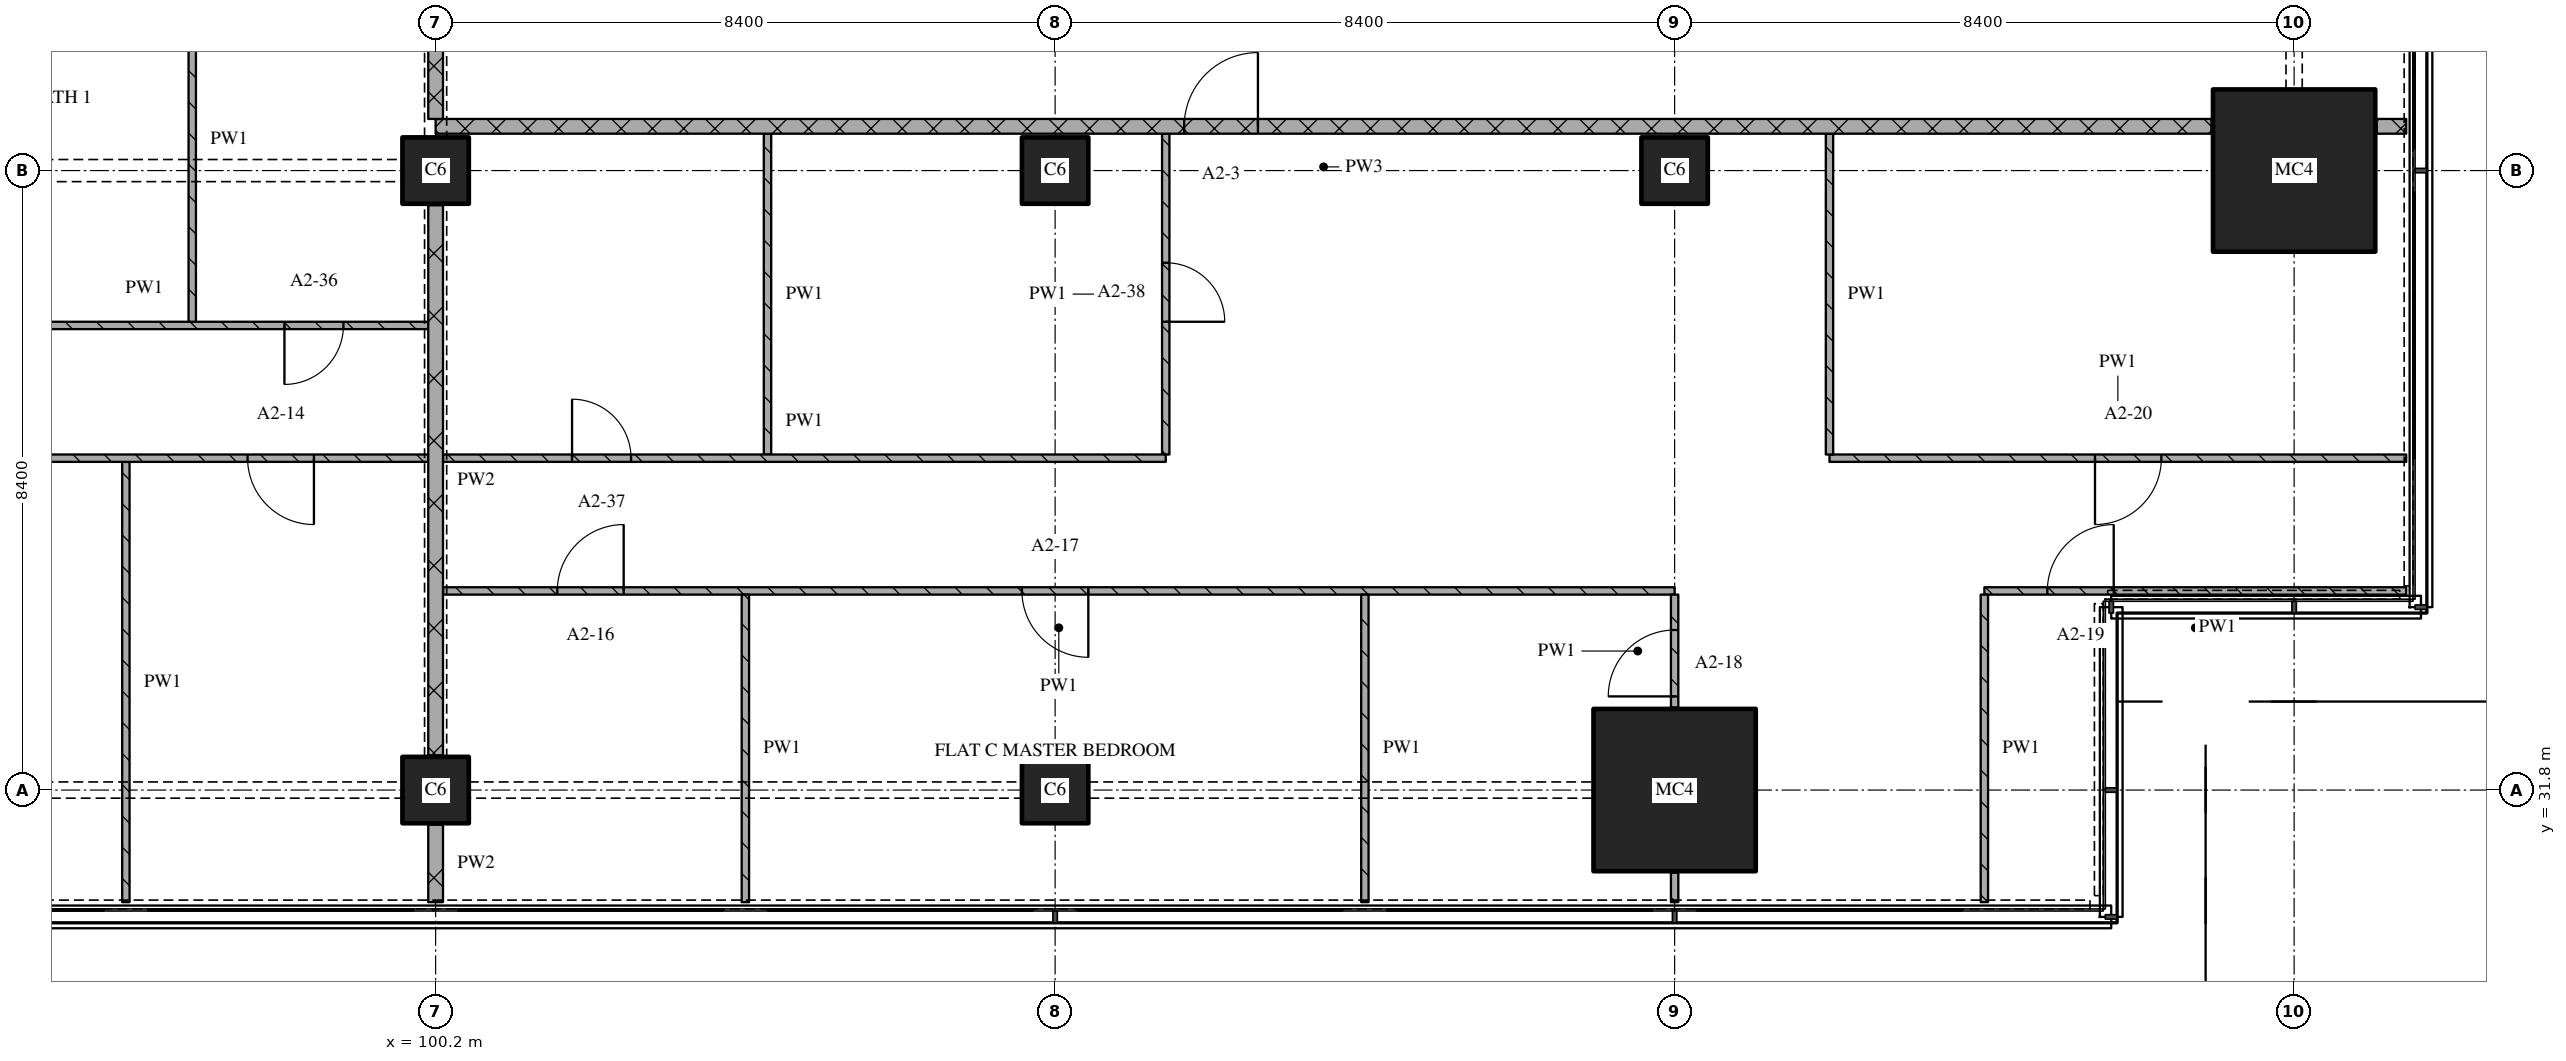
"""IFC4 building model, lengths in metres.
Left out: names, types, materials, properties, quantities, classifications, styles, units other than length and angle.
Written with IfcOpenShell. Run it as: python <this file> out.ifc"""

import sys

from ifc_helpers import new_model, si_unit, direction, frame, frame_2d, origin, origin_2d, place, context, subcontext, project, spatial, rectangle, extrude, element, fill, save


model = new_model("IFC4")
c1 = context("Model", 3, precision=1e-05, world=origin(), true_north=direction((0.0, 1.0)))
c2 = subcontext(c1, "Body", "Model", "MODEL_VIEW")
j1 = project(units=[si_unit("LENGTHUNIT", "METRE"), si_unit("PLANEANGLEUNIT", "RADIAN")], contexts=[c1])
p1 = place(None, origin())
s1 = spatial("IfcSite", under=j1, at=p1, CompositionType="ELEMENT")
p2 = place(p1, origin())
s2 = spatial("IfcBuilding", under=s1, at=p2, CompositionType="ELEMENT")
p3 = place(p2, frame((0.0, 0.0, 48.0)))
s3 = spatial("IfcBuildingStorey", under=s2, at=p3, CompositionType="ELEMENT", Elevation=48.0)
for number, where, z_axis, x_axis in (
    (1, (100.2, 31.8, 0.0), (0.0, 0.0, 1.0), (1.0, 0.0, 0.0)),
    (2, (100.2, 40.2, 0.0), (0.0, 0.0, 1.0), (1.0, 0.0, 0.0)),
    (3, (108.6, 31.8, 0.0), (0.0, 0.0, 1.0), (1.0, 0.0, 0.0)),
    (4, (108.6, 40.2, 0.0), (0.0, 0.0, 1.0), (1.0, 0.0, 0.0)),
):
    element("IfcColumn", number, at=place(p3, frame(where, z_axis=z_axis, x_axis=x_axis)), inside=s3, PredefinedType="COLUMN", context=c2, shape_type="SweptSolid", body=[
        extrude(rectangle(XDim=0.9, YDim=0.9, at=origin_2d()), origin(), (0.0, 0.0, 1.0), 3.6),
    ])
p4 = place(p3, frame((117.0, 31.8, 0.0), z_axis=(0.0, 0.0, 1.0), x_axis=(1.0, 0.0, 0.0)))
e5 = element("IfcColumn", 5, at=p4, inside=s3, PredefinedType="COLUMN", context=c2, shape_type="SweptSolid", body=[
    extrude(rectangle(XDim=2.2, YDim=2.2, at=origin_2d()), origin(), (0.0, 0.0, 1.0), 3.6),
])
p5 = place(p3, frame((117.0, 40.2, 0.0), z_axis=(0.0, 0.0, 1.0), x_axis=(1.0, 0.0, 0.0)))
e6 = element("IfcColumn", 6, at=p5, inside=s3, PredefinedType="COLUMN", context=c2, shape_type="SweptSolid", body=[
    extrude(rectangle(XDim=0.9, YDim=0.9, at=origin_2d()), origin(), (0.0, 0.0, 1.0), 3.6),
])
p6 = place(p3, frame((125.4, 40.2, 0.0), z_axis=(0.0, 0.0, 1.0), x_axis=(1.0, 0.0, 0.0)))
e7 = element("IfcColumn", 7, at=p6, inside=s3, PredefinedType="COLUMN", context=c2, shape_type="SweptSolid", body=[
    extrude(rectangle(XDim=2.2, YDim=2.2, at=origin_2d()), origin(), (0.0, 0.0, 1.0), 3.6),
])
p7 = place(p3, frame((117.0, 34.5, 0.0), z_axis=(0.0, 0.0, 1.0), x_axis=(-1.0, 0.0, 0.0)))
e8 = element("IfcWall", 8, at=p7, inside=s3, PredefinedType="PARTITIONING", context=c2, shape_type="SweptSolid", body=[
    extrude(rectangle(XDim=16.7, YDim=0.1, at=frame_2d((8.35, 0.0))), origin(), (0.0, 0.0, 1.0), 3.32),
])
p8 = place(p7, frame((7.95, 0.0, 0.0)))
e9 = element("IfcOpeningElement", 9, at=p8, cuts=e8, PredefinedType="OPENING", context=c2, shape_type="SweptSolid", body=[
    extrude(rectangle(XDim=0.9, YDim=2.1, at=frame_2d((0.45, 1.05))), frame((0.0, 0.06, 0.0), z_axis=(0.0, -1.0, 0.0), x_axis=(1.0, 0.0, 0.0)), (0.0, 0.0, 1.0), 0.12),
])
p9 = place(p7, frame((14.25, 0.0, 0.0)))
e10 = element("IfcOpeningElement", 10, at=p9, cuts=e8, PredefinedType="OPENING", context=c2, shape_type="SweptSolid", body=[
    extrude(rectangle(XDim=0.9, YDim=2.1, at=frame_2d((0.45, 1.05))), frame((0.0, 0.06, 0.0), z_axis=(0.0, -1.0, 0.0), x_axis=(1.0, 0.0, 0.0)), (0.0, 0.0, 1.0), 0.12),
])
p10 = place(p3, frame((126.92, 34.5, 0.0), z_axis=(0.0, 0.0, 1.0), x_axis=(-1.0, 0.0, 0.0)))
e11 = element("IfcWall", 11, at=p10, inside=s3, PredefinedType="PARTITIONING", context=c2, shape_type="SweptSolid", body=[
    extrude(rectangle(XDim=5.72, YDim=0.1, at=frame_2d((2.86, 0.0))), origin(), (0.0, 0.0, 1.0), 3.32),
])
p11 = place(p10, frame((3.966, 0.0, 0.0)))
e12 = element("IfcOpeningElement", 12, at=p11, cuts=e11, PredefinedType="OPENING", context=c2, shape_type="SweptSolid", body=[
    extrude(rectangle(XDim=0.9, YDim=2.1, at=frame_2d((0.45, 1.05))), frame((0.0, 0.06, 0.0), z_axis=(0.0, -1.0, 0.0), x_axis=(1.0, 0.0, 0.0)), (0.0, 0.0, 1.0), 0.12),
])
p12 = place(p3, frame((119.1, 36.3, 0.0), z_axis=(0.0, 0.0, 1.0), x_axis=(1.0, 0.0, 0.0)))
e13 = element("IfcWall", 13, at=p12, inside=s3, PredefinedType="PARTITIONING", context=c2, shape_type="SweptSolid", body=[
    extrude(rectangle(XDim=7.82, YDim=0.1, at=frame_2d((3.91, 0.0))), origin(), (0.0, 0.0, 1.0), 3.32),
])
p13 = place(p12, frame((3.6, 0.0, 0.0)))
e14 = element("IfcOpeningElement", 14, at=p13, cuts=e13, PredefinedType="OPENING", context=c2, shape_type="SweptSolid", body=[
    extrude(rectangle(XDim=0.9, YDim=2.1, at=frame_2d((0.45, 1.05))), frame((0.0, 0.06, 0.0), z_axis=(0.0, -1.0, 0.0), x_axis=(1.0, 0.0, 0.0)), (0.0, 0.0, 1.0), 0.12),
])
p14 = place(p3, frame((92.4, 38.1, 0.0), z_axis=(0.0, 0.0, 1.0), x_axis=(1.0, 0.0, 0.0)))
e15 = element("IfcWall", 15, at=p14, inside=s3, PredefinedType="PARTITIONING", context=c2, shape_type="SweptSolid", body=[
    extrude(rectangle(XDim=7.7, YDim=0.1, at=frame_2d((3.85, 0.0))), origin(), (0.0, 0.0, 1.0), 3.32),
])
p15 = place(p14, frame((5.75, 0.0, 0.0)))
e16 = element("IfcOpeningElement", 16, at=p15, cuts=e15, PredefinedType="OPENING", context=c2, shape_type="SweptSolid", body=[
    extrude(rectangle(XDim=0.8, YDim=2.1, at=frame_2d((0.4, 1.05))), frame((0.0, 0.06, 0.0), z_axis=(0.0, -1.0, 0.0), x_axis=(1.0, 0.0, 0.0)), (0.0, 0.0, 1.0), 0.12),
])
p16 = place(p3, frame((124.28, 40.8, 0.0), z_axis=(0.0, 0.0, 1.0), x_axis=(-1.0, 0.0, 0.0)))
e17 = element("IfcWall", 17, at=p16, inside=s3, PredefinedType="PARTITIONING", context=c2, shape_type="SweptSolid", body=[
    extrude(rectangle(XDim=24.08, YDim=0.2, at=frame_2d((12.04, 0.0))), origin(), (0.0, 0.0, 1.0), 3.32),
])
p17 = place(p16, frame((12.93, 0.0, 0.0)))
e18 = element("IfcOpeningElement", 18, at=p17, cuts=e17, PredefinedType="OPENING", context=c2, shape_type="SweptSolid", body=[
    extrude(rectangle(XDim=1.0, YDim=2.1, at=frame_2d((0.5, 1.05))), frame((0.0, 0.11, 0.0), z_axis=(0.0, -1.0, 0.0), x_axis=(1.0, 0.0, 0.0)), (0.0, 0.0, 1.0), 0.22),
])
p18 = place(p3, frame((126.52, 40.8, 0.0), z_axis=(0.0, 0.0, 1.0), x_axis=(1.0, 0.0, 0.0)))
e19 = element("IfcWall", 19, at=p18, inside=s3, PredefinedType="PARTITIONING", context=c2, shape_type="SweptSolid", body=[
    extrude(rectangle(XDim=0.4, YDim=0.2, at=frame_2d((0.2, 0.0))), origin(), (0.0, 0.0, 1.0), 3.32),
])
p19 = place(p3, frame((96.0, 36.25, 0.0), z_axis=(0.0, 0.0, 1.0), x_axis=(0.0, -1.0, 0.0)))
e20 = element("IfcWall", 20, at=p19, inside=s3, PredefinedType="PARTITIONING", context=c2, shape_type="SweptSolid", body=[
    extrude(rectangle(XDim=5.97, YDim=0.1, at=frame_2d((2.985, 0.0))), origin(), (0.0, 0.0, 1.0), 3.32),
])
p20 = place(p3, frame((96.9, 43.1, 0.0), z_axis=(0.0, 0.0, 1.0), x_axis=(0.0, -1.0, 0.0)))
e21 = element("IfcWall", 21, at=p20, inside=s3, PredefinedType="PARTITIONING", context=c2, shape_type="SweptSolid", body=[
    extrude(rectangle(XDim=4.95, YDim=0.1, at=frame_2d((2.475, 0.0))), origin(), (0.0, 0.0, 1.0), 3.32),
])
p21 = place(p3, frame((100.2, 43.1, 0.0), z_axis=(0.0, 0.0, 1.0), x_axis=(0.0, -1.0, 0.0)))
e22 = element("IfcWall", 22, at=p21, inside=s3, PredefinedType="PARTITIONING", context=c2, shape_type="SweptSolid", body=[
    extrude(rectangle(XDim=2.2, YDim=0.2, at=frame_2d((1.1, 0.0))), origin(), (0.0, 0.0, 1.0), 2.43),
])
p22 = place(p3, frame((100.2, 31.33, 0.0), z_axis=(0.0, 0.0, 1.0), x_axis=(0.0, -1.0, 0.0)))
e23 = element("IfcWall", 23, at=p22, inside=s3, PredefinedType="PARTITIONING", context=c2, shape_type="SweptSolid", body=[
    extrude(rectangle(XDim=1.05, YDim=0.2, at=frame_2d((0.525, 0.0))), origin(), (0.0, 0.0, 1.0), 3.32),
])
p23 = place(p3, frame((100.2, 39.73, 0.0), z_axis=(0.0, 0.0, 1.0), x_axis=(0.0, -1.0, 0.0)))
e24 = element("IfcWall", 24, at=p23, inside=s3, PredefinedType="PARTITIONING", context=c2, shape_type="SweptSolid", body=[
    extrude(rectangle(XDim=7.46, YDim=0.2, at=frame_2d((3.73, 0.0))), origin(), (0.0, 0.0, 1.0), 2.83),
])
p24 = place(p3, frame((104.4, 34.45, 0.0), z_axis=(0.0, 0.0, 1.0), x_axis=(0.0, -1.0, 0.0)))
e25 = element("IfcWall", 25, at=p24, inside=s3, PredefinedType="PARTITIONING", context=c2, shape_type="SweptSolid", body=[
    extrude(rectangle(XDim=4.17, YDim=0.1, at=frame_2d((2.085, 0.0))), origin(), (0.0, 0.0, 1.0), 3.32),
])
p25 = place(p3, frame((104.7, 40.7, 0.0), z_axis=(0.0, 0.0, 1.0), x_axis=(0.0, -1.0, 0.0)))
e26 = element("IfcWall", 26, at=p25, inside=s3, PredefinedType="PARTITIONING", context=c2, shape_type="SweptSolid", body=[
    extrude(rectangle(XDim=4.35, YDim=0.1, at=frame_2d((2.175, 0.0))), origin(), (0.0, 0.0, 1.0), 3.32),
])
p26 = place(p3, frame((110.1, 36.35, 0.0), z_axis=(0.0, 0.0, 1.0), x_axis=(0.0, 1.0, 0.0)))
e27 = element("IfcWall", 27, at=p26, inside=s3, PredefinedType="PARTITIONING", context=c2, shape_type="SweptSolid", body=[
    extrude(rectangle(XDim=4.35, YDim=0.1, at=frame_2d((2.175, 0.0))), origin(), (0.0, 0.0, 1.0), 3.32),
])
p27 = place(p26, frame((1.8, 0.0, 0.0)))
e28 = element("IfcOpeningElement", 28, at=p27, cuts=e27, PredefinedType="OPENING", context=c2, shape_type="SweptSolid", body=[
    extrude(rectangle(XDim=0.8, YDim=2.1, at=frame_2d((0.4, 1.05))), frame((0.0, 0.06, 0.0), z_axis=(0.0, -1.0, 0.0), x_axis=(1.0, 0.0, 0.0)), (0.0, 0.0, 1.0), 0.12),
])
p28 = place(p3, frame((112.8, 34.45, 0.0), z_axis=(0.0, 0.0, 1.0), x_axis=(0.0, -1.0, 0.0)))
e29 = element("IfcWall", 29, at=p28, inside=s3, PredefinedType="PARTITIONING", context=c2, shape_type="SweptSolid", body=[
    extrude(rectangle(XDim=4.17, YDim=0.1, at=frame_2d((2.085, 0.0))), origin(), (0.0, 0.0, 1.0), 3.32),
])
p29 = place(p3, frame((117.0, 30.68, 0.0), z_axis=(0.0, 0.0, 1.0), x_axis=(0.0, -1.0, 0.0)))
e30 = element("IfcWall", 30, at=p29, inside=s3, PredefinedType="PARTITIONING", context=c2, shape_type="SweptSolid", body=[
    extrude(rectangle(XDim=0.4, YDim=0.1, at=frame_2d((0.2, 0.0))), origin(), (0.0, 0.0, 1.0), 3.32),
])
p30 = place(p3, frame((117.0, 32.92, 0.0), z_axis=(0.0, 0.0, 1.0), x_axis=(0.0, 1.0, 0.0)))
e31 = element("IfcWall", 31, at=p30, inside=s3, PredefinedType="PARTITIONING", context=c2, shape_type="SweptSolid", body=[
    extrude(rectangle(XDim=1.53, YDim=0.1, at=frame_2d((0.765, 0.0))), origin(), (0.0, 0.0, 1.0), 3.32),
])
p31 = place(p30, frame((0.15, 0.0, 0.0)))
e32 = element("IfcOpeningElement", 32, at=p31, cuts=e31, PredefinedType="OPENING", context=c2, shape_type="SweptSolid", body=[
    extrude(rectangle(XDim=0.9, YDim=2.1, at=frame_2d((0.45, 1.05))), frame((0.0, 0.06, 0.0), z_axis=(0.0, -1.0, 0.0), x_axis=(1.0, 0.0, 0.0)), (0.0, 0.0, 1.0), 0.12),
])
p32 = place(p3, frame((119.1, 40.7, 0.0), z_axis=(0.0, 0.0, 1.0), x_axis=(0.0, -1.0, 0.0)))
e33 = element("IfcWall", 33, at=p32, inside=s3, PredefinedType="PARTITIONING", context=c2, shape_type="SweptSolid", body=[
    extrude(rectangle(XDim=4.35, YDim=0.1, at=frame_2d((2.175, 0.0))), origin(), (0.0, 0.0, 1.0), 3.32),
])
p33 = place(p3, frame((121.2, 34.45, 0.0), z_axis=(0.0, 0.0, 1.0), x_axis=(0.0, -1.0, 0.0)))
e34 = element("IfcWall", 34, at=p33, inside=s3, PredefinedType="PARTITIONING", context=c2, shape_type="SweptSolid", body=[
    extrude(rectangle(XDim=4.17, YDim=0.1, at=frame_2d((2.085, 0.0))), origin(), (0.0, 0.0, 1.0), 3.32),
])
p34 = place(p3, frame((100.1, 36.3, 0.0), z_axis=(0.0, 0.0, 1.0), x_axis=(-1.0, 0.0, 0.0)))
e35 = element("IfcWall", 35, at=p34, inside=s3, PredefinedType="PARTITIONING", context=c2, shape_type="SweptSolid", body=[
    extrude(rectangle(XDim=12.5, YDim=0.1, at=frame_2d((6.25, 0.0))), origin(), (0.0, 0.0, 1.0), 3.32),
])
p35 = place(p34, frame((1.55, 0.0, 0.0)))
e36 = element("IfcOpeningElement", 36, at=p35, cuts=e35, PredefinedType="OPENING", context=c2, shape_type="SweptSolid", body=[
    extrude(rectangle(XDim=0.9, YDim=2.1, at=frame_2d((0.45, 1.05))), frame((0.0, 0.06, 0.0), z_axis=(0.0, -1.0, 0.0), x_axis=(1.0, 0.0, 0.0)), (0.0, 0.0, 1.0), 0.12),
])
p36 = place(p34, frame((7.85, 0.0, 0.0)))
e37 = element("IfcOpeningElement", 37, at=p36, cuts=e35, PredefinedType="OPENING", context=c2, shape_type="SweptSolid", body=[
    extrude(rectangle(XDim=0.9, YDim=2.1, at=frame_2d((0.45, 1.05))), frame((0.0, 0.06, 0.0), z_axis=(0.0, -1.0, 0.0), x_axis=(1.0, 0.0, 0.0)), (0.0, 0.0, 1.0), 0.12),
])
p37 = place(p3, frame((100.3, 36.3, 0.0), z_axis=(0.0, 0.0, 1.0), x_axis=(1.0, 0.0, 0.0)))
e38 = element("IfcWall", 38, at=p37, inside=s3, PredefinedType="PARTITIONING", context=c2, shape_type="SweptSolid", body=[
    extrude(rectangle(XDim=9.8, YDim=0.1, at=frame_2d((4.9, 0.0))), origin(), (0.0, 0.0, 1.0), 3.32),
])
p38 = place(p37, frame((1.75, 0.0, 0.0)))
e39 = element("IfcOpeningElement", 39, at=p38, cuts=e38, PredefinedType="OPENING", context=c2, shape_type="SweptSolid", body=[
    extrude(rectangle(XDim=0.8, YDim=2.1, at=frame_2d((0.4, 1.05))), frame((0.0, 0.06, 0.0), z_axis=(0.0, -1.0, 0.0), x_axis=(1.0, 0.0, 0.0)), (0.0, 0.0, 1.0), 0.12),
])
p39 = place(p8, origin())
e40 = element("IfcDoor", 40, at=p39, inside=s3, OperationType="SINGLE_SWING_LEFT", PredefinedType="DOOR", context=c2, shape_type="SweptSolid", body=[
    extrude(rectangle(XDim=0.9, YDim=2.1, at=frame_2d((0.45, 1.05))), frame((0.0, 0.025, 0.0), z_axis=(0.0, -1.0, 0.0), x_axis=(1.0, 0.0, 0.0)), (0.0, 0.0, 1.0), 0.05),
])
fill(e9, e40)
p40 = place(p9, origin())
e41 = element("IfcDoor", 41, at=p40, inside=s3, OperationType="SINGLE_SWING_RIGHT", PredefinedType="DOOR", context=c2, shape_type="SweptSolid", body=[
    extrude(rectangle(XDim=0.9, YDim=2.1, at=frame_2d((0.45, 1.05))), frame((0.0, 0.025, 0.0), z_axis=(0.0, -1.0, 0.0), x_axis=(1.0, 0.0, 0.0)), (0.0, 0.0, 1.0), 0.05),
])
fill(e10, e41)
p41 = place(p11, origin())
e42 = element("IfcDoor", 42, at=p41, inside=s3, OperationType="SINGLE_SWING_RIGHT", PredefinedType="DOOR", context=c2, shape_type="SweptSolid", body=[
    extrude(rectangle(XDim=0.9, YDim=2.1, at=frame_2d((0.45, 1.05))), frame((0.0, 0.025, 0.0), z_axis=(0.0, -1.0, 0.0), x_axis=(1.0, 0.0, 0.0)), (0.0, 0.0, 1.0), 0.05),
])
fill(e12, e42)
p42 = place(p13, origin())
e43 = element("IfcDoor", 43, at=p42, inside=s3, OperationType="SINGLE_SWING_RIGHT", PredefinedType="DOOR", context=c2, shape_type="SweptSolid", body=[
    extrude(rectangle(XDim=0.9, YDim=2.1, at=frame_2d((0.45, 1.05))), frame((0.0, 0.025, 0.0), z_axis=(0.0, -1.0, 0.0), x_axis=(1.0, 0.0, 0.0)), (0.0, 0.0, 1.0), 0.05),
])
fill(e14, e43)
p43 = place(p15, origin())
e44 = element("IfcDoor", 44, at=p43, inside=s3, OperationType="SINGLE_SWING_RIGHT", PredefinedType="DOOR", context=c2, shape_type="SweptSolid", body=[
    extrude(rectangle(XDim=0.8, YDim=2.1, at=frame_2d((0.4, 1.05))), frame((0.0, 0.025, 0.0), z_axis=(0.0, -1.0, 0.0), x_axis=(1.0, 0.0, 0.0)), (0.0, 0.0, 1.0), 0.05),
])
fill(e16, e44)
p44 = place(p17, origin())
e45 = element("IfcDoor", 45, at=p44, inside=s3, OperationType="SINGLE_SWING_RIGHT", PredefinedType="DOOR", context=c2, shape_type="SweptSolid", body=[
    extrude(rectangle(XDim=1.0, YDim=2.1, at=frame_2d((0.5, 1.05))), frame((0.0, 0.025, 0.0), z_axis=(0.0, -1.0, 0.0), x_axis=(1.0, 0.0, 0.0)), (0.0, 0.0, 1.0), 0.05),
])
fill(e18, e45)
p45 = place(p27, origin())
e46 = element("IfcDoor", 46, at=p45, inside=s3, OperationType="SINGLE_SWING_RIGHT", PredefinedType="DOOR", context=c2, shape_type="SweptSolid", body=[
    extrude(rectangle(XDim=0.8, YDim=2.1, at=frame_2d((0.4, 1.05))), frame((0.0, 0.025, 0.0), z_axis=(0.0, -1.0, 0.0), x_axis=(1.0, 0.0, 0.0)), (0.0, 0.0, 1.0), 0.05),
])
fill(e28, e46)
p46 = place(p31, origin())
e47 = element("IfcDoor", 47, at=p46, inside=s3, OperationType="SINGLE_SWING_LEFT", PredefinedType="DOOR", context=c2, shape_type="SweptSolid", body=[
    extrude(rectangle(XDim=0.9, YDim=2.1, at=frame_2d((0.45, 1.05))), frame((0.0, 0.025, 0.0), z_axis=(0.0, -1.0, 0.0), x_axis=(1.0, 0.0, 0.0)), (0.0, 0.0, 1.0), 0.05),
])
fill(e32, e47)
p47 = place(p35, origin())
e48 = element("IfcDoor", 48, at=p47, inside=s3, OperationType="SINGLE_SWING_LEFT", PredefinedType="DOOR", context=c2, shape_type="SweptSolid", body=[
    extrude(rectangle(XDim=0.9, YDim=2.1, at=frame_2d((0.45, 1.05))), frame((0.0, 0.025, 0.0), z_axis=(0.0, -1.0, 0.0), x_axis=(1.0, 0.0, 0.0)), (0.0, 0.0, 1.0), 0.05),
])
fill(e36, e48)
p48 = place(p38, origin())
e49 = element("IfcDoor", 49, at=p48, inside=s3, OperationType="SINGLE_SWING_LEFT", PredefinedType="DOOR", context=c2, shape_type="SweptSolid", body=[
    extrude(rectangle(XDim=0.8, YDim=2.1, at=frame_2d((0.4, 1.05))), frame((0.0, 0.025, 0.0), z_axis=(0.0, -1.0, 0.0), x_axis=(1.0, 0.0, 0.0)), (0.0, 0.0, 1.0), 0.05),
])
fill(e39, e49)
save(model, sys.argv[1])
